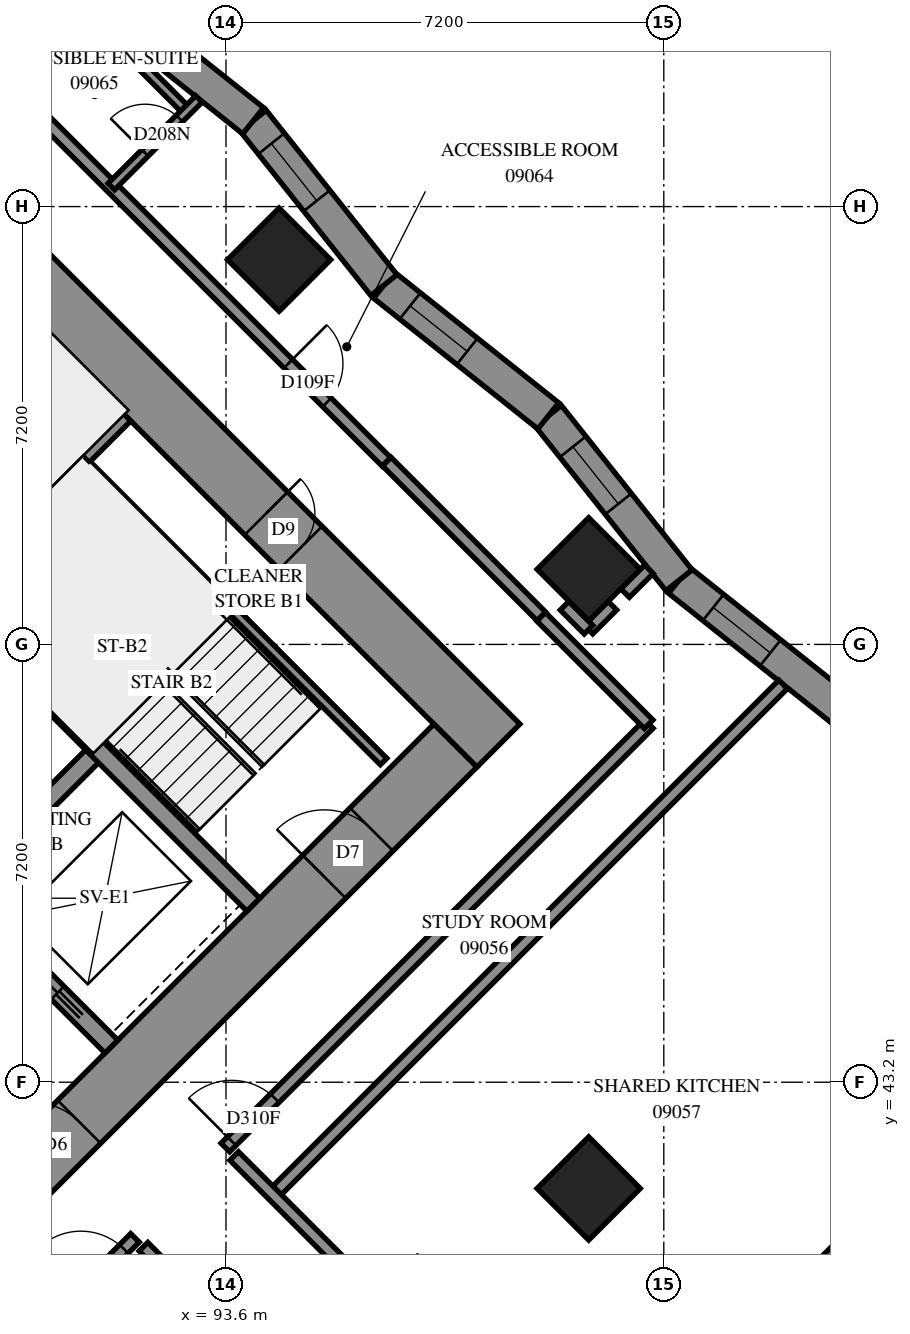
"""IFC4 building model, lengths in metres.
Left out: names, types, materials, properties, quantities, classifications, styles, units other than length and angle.
Written with IfcOpenShell. Run it as: python <this file> out.ifc"""

import sys

from ifc_helpers import new_model, si_unit, direction, frame, frame_2d, origin, origin_2d, place, context, subcontext, project, spatial, polyline, rectangle, outline, extrude, element, fill, save


model = new_model("IFC4")
c1 = context("Model", 3, precision=1e-05, world=origin(), true_north=direction((0.0, 1.0)))
c2 = subcontext(c1, "Body", "Model", "MODEL_VIEW")
j1 = project(units=[si_unit("LENGTHUNIT", "METRE"), si_unit("PLANEANGLEUNIT", "RADIAN")], contexts=[c1])
p1 = place(None, origin())
s1 = spatial("IfcSite", under=j1, at=p1, CompositionType="ELEMENT")
p2 = place(p1, origin())
s2 = spatial("IfcBuilding", under=s1, at=p2, CompositionType="ELEMENT")
p3 = place(p2, frame((0.0, 0.0, 37.2)))
s3 = spatial("IfcBuildingStorey", under=s2, at=p3, CompositionType="ELEMENT", Elevation=37.2)
for number, where, z_axis, x_axis in (
    (1, (94.474, 56.727, 0.0), (0.0, 0.0, 1.0), (0.707, -0.707, 0.0)),
    (2, (99.565, 51.635, 0.0), (0.0, 0.0, 1.0), (0.707, -0.707, 0.0)),
    (3, (99.565, 41.453, 0.0), (0.0, 0.0, 1.0), (0.707, -0.707, 0.0)),
):
    element("IfcColumn", number, at=place(p3, frame(where, z_axis=z_axis, x_axis=x_axis)), inside=s3, PredefinedType="COLUMN", context=c2, shape_type="SweptSolid", body=[
        extrude(rectangle(XDim=1.2, YDim=1.2, at=origin_2d()), origin(), (0.0, 0.0, 1.0), 3.1),
    ])
p4 = place(p3, frame((86.483, 60.333, -0.3), z_axis=(0.0, 0.0, 1.0), x_axis=(0.70710983, -0.7071037324, 0.0)))
e4 = element("IfcWall", 4, at=p4, inside=s3, PredefinedType="SHEAR", context=c2, shape_type="SweptSolid", body=[
    extrude(rectangle(XDim=16.4, YDim=1.0, at=frame_2d((8.2, 0.0))), origin(), (0.0, 0.0, 1.0), 2.7),
])
p5 = place(p4, frame((11.0, 0.0, 0.3)))
e5 = element("IfcOpeningElement", 5, at=p5, cuts=e4, PredefinedType="OPENING", context=c2, shape_type="SweptSolid", body=[
    extrude(rectangle(XDim=0.8, YDim=2.1, at=frame_2d((0.4, 1.05))), frame((0.0, 0.51, 0.0), z_axis=(0.0, -1.0, 0.0), x_axis=(1.0, 0.0, 0.0)), (0.0, 0.0, 1.0), 1.02),
])
p6 = place(p3, frame((87.19, 38.554, -0.3), z_axis=(0.0, 0.0, 1.0), x_axis=(0.707103309, 0.7071102534, 0.0)))
e6 = element("IfcWall", 6, at=p6, inside=s3, PredefinedType="SHEAR", context=c2, shape_type="SweptSolid", body=[
    extrude(rectangle(XDim=14.4, YDim=1.0, at=frame_2d((7.2, 0.0))), origin(), (0.0, 0.0, 1.0), 2.7),
])
p7 = place(p6, frame((4.55, 0.0, 0.3)))
e7 = element("IfcOpeningElement", 7, at=p7, cuts=e6, PredefinedType="OPENING", context=c2, shape_type="SweptSolid", body=[
    extrude(rectangle(XDim=1.1, YDim=2.1, at=frame_2d((0.55, 1.05))), frame((0.0, 0.51, 0.0), z_axis=(0.0, -1.0, 0.0), x_axis=(1.0, 0.0, 0.0)), (0.0, 0.0, 1.0), 1.02),
])
p8 = place(p6, frame((11.35, 0.0, 0.3)))
e8 = element("IfcOpeningElement", 8, at=p8, cuts=e6, PredefinedType="OPENING", context=c2, shape_type="SweptSolid", body=[
    extrude(rectangle(XDim=1.1, YDim=2.1, at=frame_2d((0.55, 1.05))), frame((0.0, 0.51, 0.0), z_axis=(0.0, -1.0, 0.0), x_axis=(1.0, 0.0, 0.0)), (0.0, 0.0, 1.0), 1.02),
])
p9 = place(p3, frame((89.17, 46.332, 0.0), z_axis=(0.0, 0.0, 1.0), x_axis=(0.7071067812, 0.7071067812, 0.0)))
e9 = element("IfcWall", 9, at=p9, inside=s3, PredefinedType="SOLIDWALL", context=c2, shape_type="SweptSolid", body=[
    extrude(rectangle(XDim=3.3, YDim=0.3, at=frame_2d((1.65, 0.0))), origin(), (0.0, 0.0, 1.0), 3.1),
])
p10 = place(p3, frame((81.534, 53.969, 0.0), z_axis=(0.0, 0.0, 1.0), x_axis=(0.707103309, -0.7071102534, 0.0)))
e10 = element("IfcWall", 10, at=p10, inside=s3, PredefinedType="SOLIDWALL", context=c2, shape_type="SweptSolid", body=[
    extrude(rectangle(XDim=14.4, YDim=0.3, at=frame_2d((7.2, 0.0))), origin(), (0.0, 0.0, 1.0), 3.1),
])
p11 = place(p10, frame((12.05, 0.0, 0.0)))
e11 = element("IfcOpeningElement", 11, at=p11, cuts=e10, PredefinedType="OPENING", context=c2, shape_type="SweptSolid", body=[
    extrude(rectangle(XDim=1.1, YDim=2.1, at=frame_2d((0.55, 1.05))), frame((0.0, 0.16, 0.0), z_axis=(0.0, -1.0, 0.0), x_axis=(1.0, 0.0, 0.0)), (0.0, 0.0, 1.0), 0.32),
])
p12 = place(p3, frame((88.958, 51.211, 0.0), z_axis=(0.0, 0.0, 1.0), x_axis=(0.7070998367, -0.7071137256, 0.0)))
e12 = element("IfcWall", 12, at=p12, inside=s3, PredefinedType="SOLIDWALL", context=c2, shape_type="SweptSolid", body=[
    extrude(rectangle(XDim=7.2, YDim=0.3, at=frame_2d((3.6, 0.0))), origin(), (0.0, 0.0, 1.0), 3.1),
])
p13 = place(p3, frame((88.958, 51.211, 0.0), z_axis=(0.0, 0.0, 1.0), x_axis=(0.7071067812, 0.7071067812, 0.0)))
e13 = element("IfcWall", 13, at=p13, inside=s3, PredefinedType="SOLIDWALL", context=c2, shape_type="SweptSolid", body=[
    extrude(rectangle(XDim=4.2, YDim=0.3, at=frame_2d((2.1, 0.0))), origin(), (0.0, 0.0, 1.0), 3.1),
])
p14 = place(p3, frame((103.754, 49.305, 0.0), z_axis=(0.0, 0.0, 1.0), x_axis=(-0.7826141976, 0.6225070424, 0.0)))
e14 = element("IfcWall", 14, at=p14, inside=s3, PredefinedType="SOLIDWALL", context=c2, shape_type="SweptSolid", body=[
    extrude(outline(polyline([(-0.031, -0.275), (3.423, -0.275), (3.485, 0.275), (0.031, 0.275), (-0.031, -0.275)])), origin(), (0.0, 0.0, 1.0), 3.1),
])
p15 = place(p14, frame((1.535, 0.0, 0.5)))
e15 = element("IfcOpeningElement", 15, at=p15, cuts=e14, PredefinedType="OPENING", context=c2, shape_type="SweptSolid", body=[
    extrude(rectangle(XDim=1.2, YDim=2.45, at=frame_2d((0.6, 1.225))), frame((0.0, 0.285, 0.0), z_axis=(0.0, -1.0, 0.0), x_axis=(1.0, 0.0, 0.0)), (0.0, 0.0, 1.0), 0.57),
])
p16 = place(p3, frame((101.05, 51.455, 0.0), z_axis=(0.0, 0.0, 1.0), x_axis=(-0.6225070424, 0.7826141976, 0.0)))
e16 = element("IfcWall", 16, at=p16, inside=s3, PredefinedType="SOLIDWALL", context=c2, shape_type="SweptSolid", body=[
    extrude(outline(polyline([(0.031, -0.275), (3.485, -0.275), (3.423, 0.275), (-0.031, 0.275), (0.031, -0.275)])), origin(), (0.0, 0.0, 1.0), 3.1),
])
p17 = place(p16, frame((1.604, 0.0, 0.5)))
e17 = element("IfcOpeningElement", 17, at=p17, cuts=e16, PredefinedType="OPENING", context=c2, shape_type="SweptSolid", body=[
    extrude(rectangle(XDim=1.2, YDim=2.45, at=frame_2d((0.6, 1.225))), frame((0.0, 0.285, 0.0), z_axis=(0.0, -1.0, 0.0), x_axis=(1.0, 0.0, 0.0)), (0.0, 0.0, 1.0), 0.57),
])
p18 = place(p3, frame((98.9, 54.158, 0.0), z_axis=(0.0, 0.0, 1.0), x_axis=(-0.7826029777, 0.6225211477, 0.0)))
e18 = element("IfcWall", 18, at=p18, inside=s3, PredefinedType="SOLIDWALL", context=c2, shape_type="SweptSolid", body=[
    extrude(outline(polyline([(-0.031, -0.275), (3.423, -0.275), (3.485, 0.275), (0.031, 0.275), (-0.031, -0.275)])), origin(), (0.0, 0.0, 1.0), 3.1),
])
p19 = place(p18, frame((1.704, 0.0, 0.5)))
e19 = element("IfcOpeningElement", 19, at=p19, cuts=e18, PredefinedType="OPENING", context=c2, shape_type="SweptSolid", body=[
    extrude(rectangle(XDim=1.2, YDim=2.45, at=frame_2d((0.6, 1.225))), frame((0.0, 0.285, 0.0), z_axis=(0.0, -1.0, 0.0), x_axis=(1.0, 0.0, 0.0)), (0.0, 0.0, 1.0), 0.57),
])
p20 = place(p3, frame((96.197, 56.308, 0.0), z_axis=(0.0, 0.0, 1.0), x_axis=(-0.6225070424, 0.7826141976, 0.0)))
e20 = element("IfcWall", 20, at=p20, inside=s3, PredefinedType="SOLIDWALL", context=c2, shape_type="SweptSolid", body=[
    extrude(outline(polyline([(0.031, -0.275), (3.485, -0.275), (3.423, 0.275), (-0.031, 0.275), (0.031, -0.275)])), origin(), (0.0, 0.0, 1.0), 3.1),
])
p21 = place(p20, frame((1.773, 0.0, 0.5)))
e21 = element("IfcOpeningElement", 21, at=p21, cuts=e20, PredefinedType="OPENING", context=c2, shape_type="SweptSolid", body=[
    extrude(rectangle(XDim=1.2, YDim=2.45, at=frame_2d((0.6, 1.225))), frame((0.0, 0.285, 0.0), z_axis=(0.0, -1.0, 0.0), x_axis=(1.0, 0.0, 0.0)), (0.0, 0.0, 1.0), 0.57),
])
p22 = place(p3, frame((94.047, 59.011, 0.0), z_axis=(0.0, 0.0, 1.0), x_axis=(-0.7826141976, 0.6225070424, 0.0)))
e22 = element("IfcWall", 22, at=p22, inside=s3, PredefinedType="SOLIDWALL", context=c2, shape_type="SweptSolid", body=[
    extrude(outline(polyline([(-0.031, -0.275), (3.423, -0.275), (3.485, 0.275), (0.031, 0.275), (-0.031, -0.275)])), origin(), (0.0, 0.0, 1.0), 3.1),
])
p23 = place(p22, frame((1.874, 0.0, 0.5)))
e23 = element("IfcOpeningElement", 23, at=p23, cuts=e22, PredefinedType="OPENING", context=c2, shape_type="SweptSolid", body=[
    extrude(rectangle(XDim=1.2, YDim=2.45, at=frame_2d((0.6, 1.225))), frame((0.0, 0.285, 0.0), z_axis=(0.0, -1.0, 0.0), x_axis=(1.0, 0.0, 0.0)), (0.0, 0.0, 1.0), 0.57),
])
p24 = place(p3, frame((91.313, 53.354, 0.0), z_axis=(0.0, 0.0, 1.0), x_axis=(0.7071140275, -0.7070995348, 0.0)))
e24 = element("IfcWall", 24, at=p24, inside=s3, PredefinedType="PARTITIONING", context=c2, shape_type="SweptSolid", body=[
    extrude(rectangle(XDim=6.9, YDim=0.15, at=frame_2d((3.45, 0.0))), origin(), (0.0, 0.0, 1.0), 3.1),
])
p25 = place(p3, frame((99.459, 36.255, 0.0), z_axis=(0.0, 0.0, 1.0), x_axis=(0.7071907307, 0.7070228217, 0.0)))
e25 = element("IfcWall", 25, at=p25, inside=s3, PredefinedType="PARTITIONING", context=c2, shape_type="SweptSolid", body=[
    extrude(rectangle(XDim=11.911, YDim=0.2, at=frame_2d((5.956, 0.0))), origin(), (0.0, 0.0, 1.0), 3.1),
])
p26 = place(p3, frame((94.367, 41.349, 0.0), z_axis=(0.0, 0.0, 1.0), x_axis=(0.7071109931, 0.7071025693, 0.0)))
e26 = element("IfcWall", 26, at=p26, inside=s3, PredefinedType="PARTITIONING", context=c2, shape_type="SweptSolid", body=[
    extrude(rectangle(XDim=11.871, YDim=0.2, at=frame_2d((5.936, 0.0))), origin(), (0.0, 0.0, 1.0), 3.1),
])
p27 = place(p3, frame((93.59, 42.126, 0.0), z_axis=(0.0, 0.0, 1.0), x_axis=(0.7071067812, 0.7071067812, 0.0)))
e27 = element("IfcWall", 27, at=p27, inside=s3, PredefinedType="PARTITIONING", context=c2, shape_type="SweptSolid", body=[
    extrude(rectangle(XDim=9.849, YDim=0.2, at=frame_2d((4.924, 0.0))), origin(), (0.0, 0.0, 1.0), 3.1),
])
p28 = place(p27, frame((0.148, 0.0, 0.0)))
e28 = element("IfcOpeningElement", 28, at=p28, cuts=e27, PredefinedType="OPENING", context=c2, shape_type="SweptSolid", body=[
    extrude(rectangle(XDim=1.0, YDim=2.1, at=frame_2d((0.5, 1.05))), frame((0.0, 0.11, 0.0), z_axis=(0.0, -1.0, 0.0), x_axis=(1.0, 0.0, 0.0)), (0.0, 0.0, 1.0), 0.22),
])
p29 = place(p3, frame((89.451, 60.189, 0.0), z_axis=(0.0, 0.0, 1.0), x_axis=(0.7071796965, -0.7070338583, 0.0)))
e29 = element("IfcWall", 29, at=p29, inside=s3, PredefinedType="PARTITIONING", context=c2, shape_type="SweptSolid", body=[
    extrude(rectangle(XDim=9.6, YDim=0.2, at=frame_2d((4.8, 0.0))), origin(), (0.0, 0.0, 1.0), 3.1),
])
p30 = place(p29, frame((7.315, 0.0, 0.0)))
e30 = element("IfcOpeningElement", 30, at=p30, cuts=e29, PredefinedType="OPENING", context=c2, shape_type="SweptSolid", body=[
    extrude(rectangle(XDim=0.9, YDim=2.1, at=frame_2d((0.45, 1.05))), frame((0.0, 0.11, 0.0), z_axis=(0.0, -1.0, 0.0), x_axis=(1.0, 0.0, 0.0)), (0.0, 0.0, 1.0), 0.22),
])
p31 = place(p3, frame((92.243, 40.495, 0.0), z_axis=(0.0, 0.0, 1.0), x_axis=(0.7071067812, -0.7071067812, 0.0)))
e31 = element("IfcWall", 31, at=p31, inside=s3, PredefinedType="PARTITIONING", context=c2, shape_type="SweptSolid", body=[
    extrude(rectangle(XDim=8.101, YDim=0.2, at=frame_2d((4.05, 0.0))), origin(), (0.0, 0.0, 1.0), 3.1),
])
p32 = place(p31, frame((2.75, 0.0, 0.0)))
e32 = element("IfcOpeningElement", 32, at=p32, cuts=e31, PredefinedType="OPENING", context=c2, shape_type="SweptSolid", body=[
    extrude(rectangle(XDim=0.9, YDim=2.1, at=frame_2d((0.45, 1.05))), frame((0.0, 0.11, 0.0), z_axis=(0.0, -1.0, 0.0), x_axis=(1.0, 0.0, 0.0)), (0.0, 0.0, 1.0), 0.22),
])
p33 = place(p3, frame((86.836, 35.372, 0.0), z_axis=(0.0, 0.0, 1.0), x_axis=(0.7071067812, 0.7071067812, 0.0)))
e33 = element("IfcWall", 33, at=p33, inside=s3, PredefinedType="PARTITIONING", context=c2, shape_type="SweptSolid", body=[
    extrude(rectangle(XDim=7.45, YDim=0.2, at=frame_2d((3.725, 0.0))), origin(), (0.0, 0.0, 1.0), 3.1),
])
p34 = place(p33, frame((6.192, 0.0, 0.0)))
e34 = element("IfcOpeningElement", 34, at=p34, cuts=e33, PredefinedType="OPENING", context=c2, shape_type="SweptSolid", body=[
    extrude(rectangle(XDim=1.0, YDim=2.1, at=frame_2d((0.5, 1.05))), frame((0.0, 0.11, 0.0), z_axis=(0.0, -1.0, 0.0), x_axis=(1.0, 0.0, 0.0)), (0.0, 0.0, 1.0), 0.22),
])
p35 = place(p3, frame((93.735, 41.987, 0.0), z_axis=(0.0, 0.0, 1.0), x_axis=(0.7071067812, -0.7071067812, 0.0)))
e35 = element("IfcWall", 35, at=p35, inside=s3, PredefinedType="PARTITIONING", context=c2, shape_type="SweptSolid", body=[
    extrude(rectangle(XDim=4.5, YDim=0.2, at=frame_2d((2.25, 0.0))), origin(), (0.0, 0.0, 1.0), 3.1),
])
p36 = place(p35, frame((3.274, 0.0, 0.0)))
e36 = element("IfcOpeningElement", 36, at=p36, cuts=e35, PredefinedType="OPENING", context=c2, shape_type="SweptSolid", body=[
    extrude(rectangle(XDim=1.0, YDim=2.1, at=frame_2d((0.5, 1.05))), frame((0.0, 0.11, 0.0), z_axis=(0.0, -1.0, 0.0), x_axis=(1.0, 0.0, 0.0)), (0.0, 0.0, 1.0), 0.22),
])
p37 = place(p3, frame((96.244, 53.406, 0.0), z_axis=(0.0, 0.0, 1.0), x_axis=(0.7068288851, -0.7073845681, 0.0)))
e37 = element("IfcWall", 37, at=p37, inside=s3, PredefinedType="PARTITIONING", context=c2, shape_type="SweptSolid", body=[
    extrude(rectangle(XDim=3.599, YDim=0.2, at=frame_2d((1.8, 0.0))), origin(), (0.0, 0.0, 1.0), 3.1),
])
p38 = place(p3, frame((98.783, 50.855, 0.0), z_axis=(0.0, 0.0, 1.0), x_axis=(0.7071067812, -0.7071067812, 0.0)))
e38 = element("IfcWall", 38, at=p38, inside=s3, PredefinedType="PARTITIONING", context=c2, shape_type="SweptSolid", body=[
    extrude(rectangle(XDim=2.5, YDim=0.2, at=frame_2d((1.25, 0.0))), origin(), (0.0, 0.0, 1.0), 3.1),
])
p39 = place(p3, frame((91.246, 60.881, 0.0), z_axis=(0.0, 0.0, 1.0), x_axis=(0.7071274366, -0.7070861252, 0.0)))
e39 = element("IfcWall", 39, at=p39, inside=s3, PredefinedType="PARTITIONING", context=c2, shape_type="SweptSolid", body=[
    extrude(rectangle(XDim=2.421, YDim=0.15, at=frame_2d((1.21, 0.0))), origin(), (0.0, 0.0, 1.0), 3.1),
])
p40 = place(p3, frame((91.715, 57.929, 0.0), z_axis=(0.0, 0.0, 1.0), x_axis=(0.7071067812, 0.7071067812, 0.0)))
e40 = element("IfcWall", 40, at=p40, inside=s3, PredefinedType="PARTITIONING", context=c2, shape_type="SweptSolid", body=[
    extrude(rectangle(XDim=2.037, YDim=0.15, at=frame_2d((1.018, 0.0))), origin(), (0.0, 0.0, 1.0), 3.1),
])
p41 = place(p40, frame((0.784, 0.0, 0.0)))
e41 = element("IfcOpeningElement", 41, at=p41, cuts=e40, PredefinedType="OPENING", context=c2, shape_type="SweptSolid", body=[
    extrude(rectangle(XDim=0.8, YDim=2.1, at=frame_2d((0.4, 1.05))), frame((0.0, 0.085, 0.0), z_axis=(0.0, -1.0, 0.0), x_axis=(1.0, 0.0, 0.0)), (0.0, 0.0, 1.0), 0.17),
])
for number, where, z_axis, x_axis in (
    (42, (99.561, 50.643, 0.0), (0.0, 0.0, 1.0), (0.707, 0.707, 0.0)),
    (43, (99.168, 51.036, 0.0), (0.0, 0.0, 1.0), (0.707, -0.707, 0.0)),
):
    element("IfcWall", number, at=place(p3, frame(where, z_axis=z_axis, x_axis=x_axis)), inside=s3, PredefinedType="PARTITIONING", context=c2, shape_type="SweptSolid", body=[
        extrude(rectangle(XDim=0.557, YDim=0.2, at=frame_2d((0.279, 0.0))), origin(), (0.0, 0.0, 1.0), 3.1),
    ])
p42 = place(p3, frame((100.163, 51.245, 0.0), z_axis=(0.0, 0.0, 1.0), x_axis=(0.7071067812, 0.7071067812, 0.0)))
e44 = element("IfcWall", 44, at=p42, inside=s3, PredefinedType="PARTITIONING", context=c2, shape_type="SweptSolid", body=[
    extrude(rectangle(XDim=0.554, YDim=0.2, at=frame_2d((0.277, 0.0))), origin(), (0.0, 0.0, 1.0), 3.1),
])
p43 = place(p15, origin())
e45 = element("IfcWindow", 45, at=p43, inside=s3, PartitioningType="SINGLE_PANEL", PredefinedType="WINDOW", context=c2, shape_type="SweptSolid", body=[
    extrude(rectangle(XDim=1.2, YDim=2.45, at=frame_2d((0.6, 1.225))), frame((0.0, 0.155, 0.0), z_axis=(0.0, -1.0, 0.0), x_axis=(1.0, 0.0, 0.0)), (0.0, 0.0, 1.0), 0.06),
])
fill(e15, e45)
p44 = place(p17, origin())
e46 = element("IfcWindow", 46, at=p44, inside=s3, PartitioningType="SINGLE_PANEL", PredefinedType="WINDOW", context=c2, shape_type="SweptSolid", body=[
    extrude(rectangle(XDim=1.2, YDim=2.45, at=frame_2d((0.6, 1.225))), frame((0.0, 0.155, 0.0), z_axis=(0.0, -1.0, 0.0), x_axis=(1.0, 0.0, 0.0)), (0.0, 0.0, 1.0), 0.06),
])
fill(e17, e46)
p45 = place(p19, origin())
e47 = element("IfcWindow", 47, at=p45, inside=s3, PartitioningType="SINGLE_PANEL", PredefinedType="WINDOW", context=c2, shape_type="SweptSolid", body=[
    extrude(rectangle(XDim=1.2, YDim=2.45, at=frame_2d((0.6, 1.225))), frame((0.0, 0.155, 0.0), z_axis=(0.0, -1.0, 0.0), x_axis=(1.0, 0.0, 0.0)), (0.0, 0.0, 1.0), 0.06),
])
fill(e19, e47)
p46 = place(p21, origin())
e48 = element("IfcWindow", 48, at=p46, inside=s3, PartitioningType="SINGLE_PANEL", PredefinedType="WINDOW", context=c2, shape_type="SweptSolid", body=[
    extrude(rectangle(XDim=1.2, YDim=2.45, at=frame_2d((0.6, 1.225))), frame((0.0, 0.155, 0.0), z_axis=(0.0, -1.0, 0.0), x_axis=(1.0, 0.0, 0.0)), (0.0, 0.0, 1.0), 0.06),
])
fill(e21, e48)
p47 = place(p23, origin())
e49 = element("IfcWindow", 49, at=p47, inside=s3, PartitioningType="SINGLE_PANEL", PredefinedType="WINDOW", context=c2, shape_type="SweptSolid", body=[
    extrude(rectangle(XDim=1.2, YDim=2.45, at=frame_2d((0.6, 1.225))), frame((0.0, 0.155, 0.0), z_axis=(0.0, -1.0, 0.0), x_axis=(1.0, 0.0, 0.0)), (0.0, 0.0, 1.0), 0.06),
])
fill(e23, e49)
p48 = place(p5, origin())
e50 = element("IfcDoor", 50, at=p48, inside=s3, OperationType="SINGLE_SWING_RIGHT", PredefinedType="DOOR", context=c2, shape_type="SweptSolid", body=[
    extrude(rectangle(XDim=0.8, YDim=2.1, at=frame_2d((0.4, 1.05))), frame((0.0, -0.44, 0.0), z_axis=(0.0, -1.0, 0.0), x_axis=(1.0, 0.0, 0.0)), (0.0, 0.0, 1.0), 0.05),
])
fill(e5, e50)
p49 = place(p7, origin())
e51 = element("IfcDoor", 51, at=p49, inside=s3, OperationType="DOUBLE_DOOR_SINGLE_SWING", PredefinedType="DOOR", context=c2, shape_type="SweptSolid", body=[
    extrude(rectangle(XDim=1.1, YDim=2.1, at=frame_2d((0.55, 1.05))), frame((0.0, 0.025, 0.0), z_axis=(0.0, -1.0, 0.0), x_axis=(1.0, 0.0, 0.0)), (0.0, 0.0, 1.0), 0.05),
])
fill(e7, e51)
p50 = place(p8, origin())
e52 = element("IfcDoor", 52, at=p50, inside=s3, OperationType="SINGLE_SWING_RIGHT", PredefinedType="DOOR", context=c2, shape_type="SweptSolid", body=[
    extrude(rectangle(XDim=1.1, YDim=2.1, at=frame_2d((0.55, 1.05))), frame((0.0, 0.025, 0.0), z_axis=(0.0, -1.0, 0.0), x_axis=(1.0, 0.0, 0.0)), (0.0, 0.0, 1.0), 0.05),
])
fill(e8, e52)
p51 = place(p11, origin())
e53 = element("IfcDoor", 53, at=p51, inside=s3, OperationType="SLIDING_TO_RIGHT", PredefinedType="DOOR", context=c2, shape_type="SweptSolid", body=[
    extrude(rectangle(XDim=1.1, YDim=2.1, at=frame_2d((0.55, 1.05))), frame((0.0, 0.025, 0.0), z_axis=(0.0, -1.0, 0.0), x_axis=(1.0, 0.0, 0.0)), (0.0, 0.0, 1.0), 0.05),
])
fill(e11, e53)
p52 = place(p28, origin())
e54 = element("IfcDoor", 54, at=p52, inside=s3, OperationType="SINGLE_SWING_LEFT", PredefinedType="DOOR", context=c2, shape_type="SweptSolid", body=[
    extrude(rectangle(XDim=1.0, YDim=2.1, at=frame_2d((0.5, 1.05))), frame((0.0, 0.025, 0.0), z_axis=(0.0, -1.0, 0.0), x_axis=(1.0, 0.0, 0.0)), (0.0, 0.0, 1.0), 0.05),
])
fill(e28, e54)
p53 = place(p30, origin())
e55 = element("IfcDoor", 55, at=p53, inside=s3, OperationType="SINGLE_SWING_LEFT", PredefinedType="DOOR", context=c2, shape_type="SweptSolid", body=[
    extrude(rectangle(XDim=0.9, YDim=2.1, at=frame_2d((0.45, 1.05))), frame((0.0, 0.025, 0.0), z_axis=(0.0, -1.0, 0.0), x_axis=(1.0, 0.0, 0.0)), (0.0, 0.0, 1.0), 0.05),
])
fill(e30, e55)
p54 = place(p41, origin())
e56 = element("IfcDoor", 56, at=p54, inside=s3, OperationType="SINGLE_SWING_RIGHT", PredefinedType="DOOR", context=c2, shape_type="SweptSolid", body=[
    extrude(rectangle(XDim=0.8, YDim=2.1, at=frame_2d((0.4, 1.05))), frame((0.0, 0.025, 0.0), z_axis=(0.0, -1.0, 0.0), x_axis=(1.0, 0.0, 0.0)), (0.0, 0.0, 1.0), 0.05),
])
fill(e41, e56)
p55 = place(p34, origin())
e57 = element("IfcDoor", 57, at=p55, inside=s3, OperationType="SINGLE_SWING_RIGHT", PredefinedType="DOOR", context=c2, shape_type="SweptSolid", body=[
    extrude(rectangle(XDim=1.0, YDim=2.1, at=frame_2d((0.5, 1.05))), frame((0.0, 0.025, 0.0), z_axis=(0.0, -1.0, 0.0), x_axis=(1.0, 0.0, 0.0)), (0.0, 0.0, 1.0), 0.05),
])
fill(e34, e57)
save(model, sys.argv[1])
